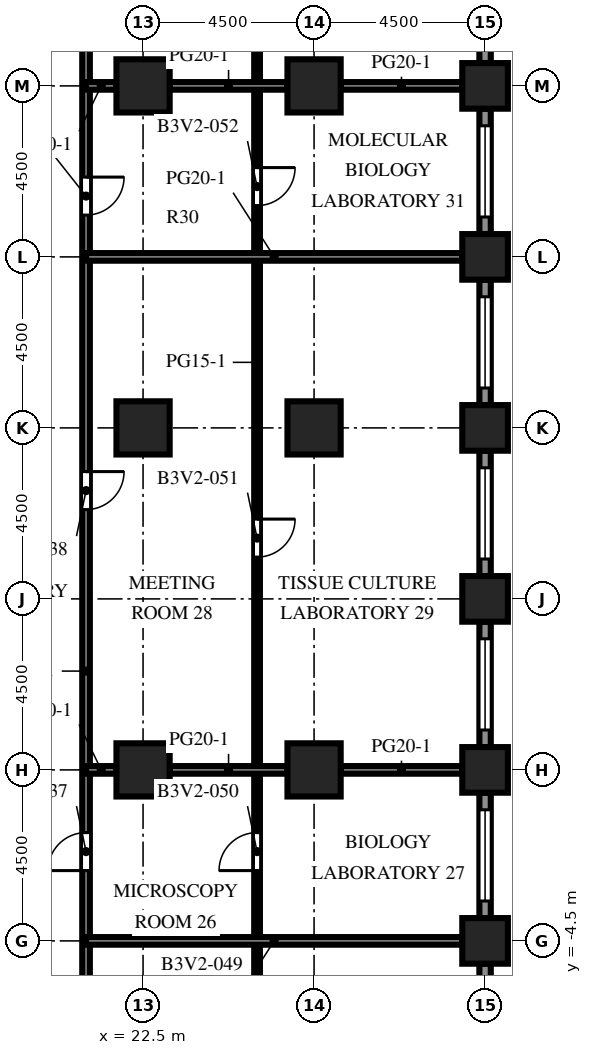
"""IFC4 building model, lengths in metres.
Left out: names, types, materials, properties, quantities, classifications, styles, units other than length and angle.
Written with IfcOpenShell. Run it as: python <this file> out.ifc"""

import sys

from ifc_helpers import new_model, si_unit, direction, frame, frame_2d, origin, origin_2d, place, context, subcontext, project, spatial, rectangle, extrude, element, fill, save


model = new_model("IFC4")
c1 = context("Model", 3, precision=1e-05, world=origin(), true_north=direction((0.0, 1.0)))
c2 = subcontext(c1, "Body", "Model", "MODEL_VIEW")
j1 = project(units=[si_unit("LENGTHUNIT", "METRE"), si_unit("PLANEANGLEUNIT", "RADIAN")], contexts=[c1])
p1 = place(None, origin())
s1 = spatial("IfcSite", under=j1, at=p1, CompositionType="ELEMENT")
p2 = place(p1, origin())
s2 = spatial("IfcBuilding", under=s1, at=p2, CompositionType="ELEMENT")
p3 = place(p2, frame((0.0, 0.0, 102.5)))
s3 = spatial("IfcBuildingStorey", under=s2, at=p3, CompositionType="ELEMENT", Elevation=102.5)
for number, where, z_axis, x_axis in (
    (1, (31.5, -4.5, 0.0), (0.0, 0.0, 1.0), (1.0, 0.0, 0.0)),
    (2, (31.5, 0.0, 0.0), (0.0, 0.0, 1.0), (1.0, 0.0, 0.0)),
    (3, (31.5, 4.5, 0.0), (0.0, 0.0, 1.0), (1.0, 0.0, 0.0)),
    (4, (31.5, 9.0, 0.0), (0.0, 0.0, 1.0), (1.0, 0.0, 0.0)),
    (5, (31.5, 13.5, 0.0), (0.0, 0.0, 1.0), (1.0, 0.0, 0.0)),
    (6, (31.5, 18.0, 0.0), (0.0, 0.0, 1.0), (1.0, 0.0, 0.0)),
):
    element("IfcColumn", number, at=place(p3, frame(where, z_axis=z_axis, x_axis=x_axis)), inside=s3, PredefinedType="COLUMN", context=c2, shape_type="SweptSolid", body=[
        extrude(rectangle(XDim=1.2, YDim=1.2, at=origin_2d()), origin(), (0.0, 0.0, 1.0), 4.1),
    ])
for number, where, z_axis, x_axis in (
    (7, (22.5, 0.0, 0.0), (0.0, 0.0, 1.0), (1.0, 0.0, 0.0)),
    (8, (22.5, 9.0, 0.0), (0.0, 0.0, 1.0), (1.0, 0.0, 0.0)),
    (9, (22.5, 18.0, 0.0), (0.0, 0.0, 1.0), (1.0, 0.0, 0.0)),
    (10, (27.0, 0.0, 0.0), (0.0, 0.0, 1.0), (1.0, 0.0, 0.0)),
    (11, (27.0, 9.0, 0.0), (0.0, 0.0, 1.0), (1.0, 0.0, 0.0)),
    (12, (27.0, 18.0, 0.0), (0.0, 0.0, 1.0), (1.0, 0.0, 0.0)),
):
    element("IfcColumn", number, at=place(p3, frame(where, z_axis=z_axis, x_axis=x_axis)), inside=s3, PredefinedType="COLUMN", context=c2, shape_type="SweptSolid", body=[
        extrude(rectangle(XDim=1.4, YDim=1.4, at=origin_2d()), origin(), (0.0, 0.0, 1.0), 4.1),
    ])
p4 = place(p3, frame((31.5, -5.1, 0.0), z_axis=(0.0, 0.0, 1.0), x_axis=(0.0, -1.0, 0.0)))
e13 = element("IfcWall", 13, at=p4, inside=s3, PredefinedType="SOLIDWALL", context=c2, shape_type="SweptSolid", body=[
    extrude(rectangle(XDim=3.3, YDim=0.3, at=frame_2d((1.65, 0.0))), origin(), (0.0, 0.0, 1.0), 2.75),
])
p5 = place(p4, frame((0.45, 0.0, 0.8)))
e14 = element("IfcOpeningElement", 14, at=p5, cuts=e13, PredefinedType="OPENING", context=c2, shape_type="SweptSolid", body=[
    extrude(rectangle(XDim=2.4, YDim=1.7, at=frame_2d((1.2, 0.85))), frame((0.0, 0.16, 0.0), z_axis=(0.0, -1.0, 0.0), x_axis=(1.0, 0.0, 0.0)), (0.0, 0.0, 1.0), 0.32),
])
p6 = place(p3, frame((31.5, -0.6, 0.0), z_axis=(0.0, 0.0, 1.0), x_axis=(0.0, -1.0, 0.0)))
e15 = element("IfcWall", 15, at=p6, inside=s3, PredefinedType="SOLIDWALL", context=c2, shape_type="SweptSolid", body=[
    extrude(rectangle(XDim=3.3, YDim=0.3, at=frame_2d((1.65, 0.0))), origin(), (0.0, 0.0, 1.0), 2.75),
])
p7 = place(p6, frame((0.45, 0.0, 0.8)))
e16 = element("IfcOpeningElement", 16, at=p7, cuts=e15, PredefinedType="OPENING", context=c2, shape_type="SweptSolid", body=[
    extrude(rectangle(XDim=2.4, YDim=1.7, at=frame_2d((1.2, 0.85))), frame((0.0, 0.16, 0.0), z_axis=(0.0, -1.0, 0.0), x_axis=(1.0, 0.0, 0.0)), (0.0, 0.0, 1.0), 0.32),
])
p8 = place(p3, frame((31.5, 3.9, 0.0), z_axis=(0.0, 0.0, 1.0), x_axis=(0.0, -1.0, 0.0)))
e17 = element("IfcWall", 17, at=p8, inside=s3, PredefinedType="SOLIDWALL", context=c2, shape_type="SweptSolid", body=[
    extrude(rectangle(XDim=3.3, YDim=0.3, at=frame_2d((1.65, 0.0))), origin(), (0.0, 0.0, 1.0), 2.75),
])
p9 = place(p8, frame((0.45, 0.0, 0.8)))
e18 = element("IfcOpeningElement", 18, at=p9, cuts=e17, PredefinedType="OPENING", context=c2, shape_type="SweptSolid", body=[
    extrude(rectangle(XDim=2.4, YDim=1.7, at=frame_2d((1.2, 0.85))), frame((0.0, 0.16, 0.0), z_axis=(0.0, -1.0, 0.0), x_axis=(1.0, 0.0, 0.0)), (0.0, 0.0, 1.0), 0.32),
])
p10 = place(p3, frame((31.5, 8.4, 0.0), z_axis=(0.0, 0.0, 1.0), x_axis=(0.0, -1.0, 0.0)))
e19 = element("IfcWall", 19, at=p10, inside=s3, PredefinedType="SOLIDWALL", context=c2, shape_type="SweptSolid", body=[
    extrude(rectangle(XDim=3.3, YDim=0.3, at=frame_2d((1.65, 0.0))), origin(), (0.0, 0.0, 1.0), 2.75),
])
p11 = place(p10, frame((0.45, 0.0, 0.8)))
e20 = element("IfcOpeningElement", 20, at=p11, cuts=e19, PredefinedType="OPENING", context=c2, shape_type="SweptSolid", body=[
    extrude(rectangle(XDim=2.4, YDim=1.7, at=frame_2d((1.2, 0.85))), frame((0.0, 0.16, 0.0), z_axis=(0.0, -1.0, 0.0), x_axis=(1.0, 0.0, 0.0)), (0.0, 0.0, 1.0), 0.32),
])
p12 = place(p3, frame((31.5, 12.9, 0.0), z_axis=(0.0, 0.0, 1.0), x_axis=(0.0, -1.0, 0.0)))
e21 = element("IfcWall", 21, at=p12, inside=s3, PredefinedType="SOLIDWALL", context=c2, shape_type="SweptSolid", body=[
    extrude(rectangle(XDim=3.3, YDim=0.3, at=frame_2d((1.65, 0.0))), origin(), (0.0, 0.0, 1.0), 2.75),
])
p13 = place(p12, frame((0.45, 0.0, 0.8)))
e22 = element("IfcOpeningElement", 22, at=p13, cuts=e21, PredefinedType="OPENING", context=c2, shape_type="SweptSolid", body=[
    extrude(rectangle(XDim=2.4, YDim=1.7, at=frame_2d((1.2, 0.85))), frame((0.0, 0.16, 0.0), z_axis=(0.0, -1.0, 0.0), x_axis=(1.0, 0.0, 0.0)), (0.0, 0.0, 1.0), 0.32),
])
p14 = place(p3, frame((31.5, 17.4, 0.0), z_axis=(0.0, 0.0, 1.0), x_axis=(0.0, -1.0, 0.0)))
e23 = element("IfcWall", 23, at=p14, inside=s3, PredefinedType="SOLIDWALL", context=c2, shape_type="SweptSolid", body=[
    extrude(rectangle(XDim=3.3, YDim=0.3, at=frame_2d((1.65, 0.0))), origin(), (0.0, 0.0, 1.0), 2.75),
])
p15 = place(p14, frame((0.45, 0.0, 0.8)))
e24 = element("IfcOpeningElement", 24, at=p15, cuts=e23, PredefinedType="OPENING", context=c2, shape_type="SweptSolid", body=[
    extrude(rectangle(XDim=2.4, YDim=1.7, at=frame_2d((1.2, 0.85))), frame((0.0, 0.16, 0.0), z_axis=(0.0, -1.0, 0.0), x_axis=(1.0, 0.0, 0.0)), (0.0, 0.0, 1.0), 0.32),
])
p16 = place(p3, frame((31.5, 21.9, 0.0), z_axis=(0.0, 0.0, 1.0), x_axis=(0.0, -1.0, 0.0)))
e25 = element("IfcWall", 25, at=p16, inside=s3, PredefinedType="SOLIDWALL", context=c2, shape_type="SweptSolid", body=[
    extrude(rectangle(XDim=3.3, YDim=0.3, at=frame_2d((1.65, 0.0))), origin(), (0.0, 0.0, 1.0), 2.75),
])
p17 = place(p16, frame((1.15, 0.0, 0.0)))
e26 = element("IfcOpeningElement", 26, at=p17, cuts=e25, PredefinedType="OPENING", context=c2, shape_type="SweptSolid", body=[
    extrude(rectangle(XDim=1.0, YDim=2.2, at=frame_2d((0.5, 1.1))), frame((0.0, 0.16, 0.0), z_axis=(0.0, -1.0, 0.0), x_axis=(1.0, 0.0, 0.0)), (0.0, 0.0, 1.0), 0.32),
])
p18 = place(p3, frame((21.0, 31.35, 0.0), z_axis=(0.0, 0.0, 1.0), x_axis=(0.0, -1.0, 0.0)))
e27 = element("IfcWall", 27, at=p18, inside=s3, PredefinedType="PARTITIONING", context=c2, shape_type="SweptSolid", body=[
    extrude(rectangle(XDim=53.7, YDim=0.2, at=frame_2d((26.85, 0.0))), origin(), (0.0, 0.0, 1.0), 3.65),
])
p19 = place(p18, frame((50.5, 0.0, 0.0)))
e28 = element("IfcOpeningElement", 28, at=p19, cuts=e27, PredefinedType="OPENING", context=c2, shape_type="SweptSolid", body=[
    extrude(rectangle(XDim=1.0, YDim=2.1, at=frame_2d((0.5, 1.05))), frame((0.0, 0.11, 0.0), z_axis=(0.0, -1.0, 0.0), x_axis=(1.0, 0.0, 0.0)), (0.0, 0.0, 1.0), 0.22),
])
p20 = place(p18, frame((46.5, 0.0, 0.0)))
e29 = element("IfcOpeningElement", 29, at=p20, cuts=e27, PredefinedType="OPENING", context=c2, shape_type="SweptSolid", body=[
    extrude(rectangle(XDim=1.0, YDim=2.1, at=frame_2d((0.5, 1.05))), frame((0.0, 0.11, 0.0), z_axis=(0.0, -1.0, 0.0), x_axis=(1.0, 0.0, 0.0)), (0.0, 0.0, 1.0), 0.22),
])
p21 = place(p18, frame((38.5, 0.0, 0.0)))
e30 = element("IfcOpeningElement", 30, at=p21, cuts=e27, PredefinedType="OPENING", context=c2, shape_type="SweptSolid", body=[
    extrude(rectangle(XDim=1.0, YDim=2.1, at=frame_2d((0.5, 1.05))), frame((0.0, 0.11, 0.0), z_axis=(0.0, -1.0, 0.0), x_axis=(1.0, 0.0, 0.0)), (0.0, 0.0, 1.0), 0.22),
])
p22 = place(p18, frame((33.0, 0.0, 0.0)))
e31 = element("IfcOpeningElement", 31, at=p22, cuts=e27, PredefinedType="OPENING", context=c2, shape_type="SweptSolid", body=[
    extrude(rectangle(XDim=1.0, YDim=2.1, at=frame_2d((0.5, 1.05))), frame((0.0, 0.11, 0.0), z_axis=(0.0, -1.0, 0.0), x_axis=(1.0, 0.0, 0.0)), (0.0, 0.0, 1.0), 0.22),
])
p23 = place(p18, frame((23.5, 0.0, 0.0)))
e32 = element("IfcOpeningElement", 32, at=p23, cuts=e27, PredefinedType="OPENING", context=c2, shape_type="SweptSolid", body=[
    extrude(rectangle(XDim=1.0, YDim=2.1, at=frame_2d((0.5, 1.05))), frame((0.0, 0.11, 0.0), z_axis=(0.0, -1.0, 0.0), x_axis=(1.0, 0.0, 0.0)), (0.0, 0.0, 1.0), 0.22),
])
p24 = place(p18, frame((15.75, 0.0, 0.0)))
e33 = element("IfcOpeningElement", 33, at=p24, cuts=e27, PredefinedType="OPENING", context=c2, shape_type="SweptSolid", body=[
    extrude(rectangle(XDim=1.0, YDim=2.1, at=frame_2d((0.5, 1.05))), frame((0.0, 0.11, 0.0), z_axis=(0.0, -1.0, 0.0), x_axis=(1.0, 0.0, 0.0)), (0.0, 0.0, 1.0), 0.22),
])
p25 = place(p18, frame((7.0, 0.0, 0.0)))
e34 = element("IfcOpeningElement", 34, at=p25, cuts=e27, PredefinedType="OPENING", context=c2, shape_type="SweptSolid", body=[
    extrude(rectangle(XDim=1.0, YDim=2.1, at=frame_2d((0.5, 1.05))), frame((0.0, 0.11, 0.0), z_axis=(0.0, -1.0, 0.0), x_axis=(1.0, 0.0, 0.0)), (0.0, 0.0, 1.0), 0.22),
])
p26 = place(p18, frame((1.0, 0.0, 0.0)))
e35 = element("IfcOpeningElement", 35, at=p26, cuts=e27, PredefinedType="OPENING", context=c2, shape_type="SweptSolid", body=[
    extrude(rectangle(XDim=1.0, YDim=2.1, at=frame_2d((0.5, 1.05))), frame((0.0, 0.11, 0.0), z_axis=(0.0, -1.0, 0.0), x_axis=(1.0, 0.0, 0.0)), (0.0, 0.0, 1.0), 0.22),
])
p27 = place(p3, frame((25.5, 31.35, 0.0), z_axis=(0.0, 0.0, 1.0), x_axis=(0.0, -1.0, 0.0)))
e36 = element("IfcWall", 36, at=p27, inside=s3, PredefinedType="PARTITIONING", context=c2, shape_type="SweptSolid", body=[
    extrude(rectangle(XDim=53.7, YDim=0.15, at=frame_2d((26.85, 0.0))), origin(), (0.0, 0.0, 1.0), 3.65),
])
p28 = place(p27, frame((50.5, 0.0, 0.0)))
e37 = element("IfcOpeningElement", 37, at=p28, cuts=e36, PredefinedType="OPENING", context=c2, shape_type="SweptSolid", body=[
    extrude(rectangle(XDim=1.0, YDim=2.1, at=frame_2d((0.5, 1.05))), frame((0.0, 0.085, 0.0), z_axis=(0.0, -1.0, 0.0), x_axis=(1.0, 0.0, 0.0)), (0.0, 0.0, 1.0), 0.17),
])
p29 = place(p27, frame((46.25, 0.0, 0.0)))
e38 = element("IfcOpeningElement", 38, at=p29, cuts=e36, PredefinedType="OPENING", context=c2, shape_type="SweptSolid", body=[
    extrude(rectangle(XDim=1.0, YDim=2.1, at=frame_2d((0.5, 1.05))), frame((0.0, 0.085, 0.0), z_axis=(0.0, -1.0, 0.0), x_axis=(1.0, 0.0, 0.0)), (0.0, 0.0, 1.0), 0.17),
])
p30 = place(p27, frame((38.5, 0.0, 0.0)))
e39 = element("IfcOpeningElement", 39, at=p30, cuts=e36, PredefinedType="OPENING", context=c2, shape_type="SweptSolid", body=[
    extrude(rectangle(XDim=1.0, YDim=2.1, at=frame_2d((0.5, 1.05))), frame((0.0, 0.085, 0.0), z_axis=(0.0, -1.0, 0.0), x_axis=(1.0, 0.0, 0.0)), (0.0, 0.0, 1.0), 0.17),
])
p31 = place(p27, frame((33.0, 0.0, 0.0)))
e40 = element("IfcOpeningElement", 40, at=p31, cuts=e36, PredefinedType="OPENING", context=c2, shape_type="SweptSolid", body=[
    extrude(rectangle(XDim=1.0, YDim=2.1, at=frame_2d((0.5, 1.05))), frame((0.0, 0.085, 0.0), z_axis=(0.0, -1.0, 0.0), x_axis=(1.0, 0.0, 0.0)), (0.0, 0.0, 1.0), 0.17),
])
p32 = place(p27, frame((24.75, 0.0, 0.0)))
e41 = element("IfcOpeningElement", 41, at=p32, cuts=e36, PredefinedType="OPENING", context=c2, shape_type="SweptSolid", body=[
    extrude(rectangle(XDim=1.0, YDim=2.1, at=frame_2d((0.5, 1.05))), frame((0.0, 0.085, 0.0), z_axis=(0.0, -1.0, 0.0), x_axis=(1.0, 0.0, 0.0)), (0.0, 0.0, 1.0), 0.17),
])
p33 = place(p27, frame((15.5, 0.0, 0.0)))
e42 = element("IfcOpeningElement", 42, at=p33, cuts=e36, PredefinedType="OPENING", context=c2, shape_type="SweptSolid", body=[
    extrude(rectangle(XDim=1.0, YDim=2.1, at=frame_2d((0.5, 1.05))), frame((0.0, 0.085, 0.0), z_axis=(0.0, -1.0, 0.0), x_axis=(1.0, 0.0, 0.0)), (0.0, 0.0, 1.0), 0.17),
])
p34 = place(p27, frame((9.75, 0.0, 0.0)))
e43 = element("IfcOpeningElement", 43, at=p34, cuts=e36, PredefinedType="OPENING", context=c2, shape_type="SweptSolid", body=[
    extrude(rectangle(XDim=1.0, YDim=2.1, at=frame_2d((0.5, 1.05))), frame((0.0, 0.085, 0.0), z_axis=(0.0, -1.0, 0.0), x_axis=(1.0, 0.0, 0.0)), (0.0, 0.0, 1.0), 0.17),
])
p35 = place(p27, frame((1.5, 0.0, 0.0)))
e44 = element("IfcOpeningElement", 44, at=p35, cuts=e36, PredefinedType="OPENING", context=c2, shape_type="SweptSolid", body=[
    extrude(rectangle(XDim=1.0, YDim=2.1, at=frame_2d((0.5, 1.05))), frame((0.0, 0.085, 0.0), z_axis=(0.0, -1.0, 0.0), x_axis=(1.0, 0.0, 0.0)), (0.0, 0.0, 1.0), 0.17),
])
p36 = place(p3, frame((21.0, -4.5, 0.0), z_axis=(0.0, 0.0, 1.0), x_axis=(1.0, 0.0, 0.0)))
e45 = element("IfcWall", 45, at=p36, inside=s3, PredefinedType="PARTITIONING", context=c2, shape_type="SweptSolid", body=[
    extrude(rectangle(XDim=9.9, YDim=0.2, at=frame_2d((4.95, 0.0))), origin(), (0.0, 0.0, 1.0), 3.65),
])
p37 = place(p3, frame((21.0, 0.0, 0.0), z_axis=(0.0, 0.0, 1.0), x_axis=(1.0, 0.0, 0.0)))
e46 = element("IfcWall", 46, at=p37, inside=s3, PredefinedType="PARTITIONING", context=c2, shape_type="SweptSolid", body=[
    extrude(rectangle(XDim=0.8, YDim=0.2, at=frame_2d((0.4, 0.0))), origin(), (0.0, 0.0, 1.0), 3.65),
])
p38 = place(p3, frame((23.2, 0.0, 0.0), z_axis=(0.0, 0.0, 1.0), x_axis=(1.0, 0.0, 0.0)))
e47 = element("IfcWall", 47, at=p38, inside=s3, PredefinedType="PARTITIONING", context=c2, shape_type="SweptSolid", body=[
    extrude(rectangle(XDim=3.1, YDim=0.2, at=frame_2d((1.55, 0.0))), origin(), (0.0, 0.0, 1.0), 3.65),
])
p39 = place(p3, frame((27.7, 0.0, 0.0), z_axis=(0.0, 0.0, 1.0), x_axis=(1.0, 0.0, 0.0)))
e48 = element("IfcWall", 48, at=p39, inside=s3, PredefinedType="PARTITIONING", context=c2, shape_type="SweptSolid", body=[
    extrude(rectangle(XDim=3.2, YDim=0.2, at=frame_2d((1.6, 0.0))), origin(), (0.0, 0.0, 1.0), 3.65),
])
p40 = place(p3, frame((21.0, 13.5, 0.0), z_axis=(0.0, 0.0, 1.0), x_axis=(1.0, 0.0, 0.0)))
e49 = element("IfcWall", 49, at=p40, inside=s3, PredefinedType="PARTITIONING", context=c2, shape_type="SweptSolid", body=[
    extrude(rectangle(XDim=9.9, YDim=0.2, at=frame_2d((4.95, 0.0))), origin(), (0.0, 0.0, 1.0), 3.65),
])
p41 = place(p3, frame((21.0, 18.0, 0.0), z_axis=(0.0, 0.0, 1.0), x_axis=(1.0, 0.0, 0.0)))
e50 = element("IfcWall", 50, at=p41, inside=s3, PredefinedType="PARTITIONING", context=c2, shape_type="SweptSolid", body=[
    extrude(rectangle(XDim=0.8, YDim=0.2, at=frame_2d((0.4, 0.0))), origin(), (0.0, 0.0, 1.0), 3.65),
])
p42 = place(p3, frame((23.2, 18.0, 0.0), z_axis=(0.0, 0.0, 1.0), x_axis=(1.0, 0.0, 0.0)))
e51 = element("IfcWall", 51, at=p42, inside=s3, PredefinedType="PARTITIONING", context=c2, shape_type="SweptSolid", body=[
    extrude(rectangle(XDim=3.1, YDim=0.2, at=frame_2d((1.55, 0.0))), origin(), (0.0, 0.0, 1.0), 3.65),
])
p43 = place(p3, frame((27.7, 18.0, 0.0), z_axis=(0.0, 0.0, 1.0), x_axis=(1.0, 0.0, 0.0)))
e52 = element("IfcWall", 52, at=p43, inside=s3, PredefinedType="PARTITIONING", context=c2, shape_type="SweptSolid", body=[
    extrude(rectangle(XDim=3.2, YDim=0.2, at=frame_2d((1.6, 0.0))), origin(), (0.0, 0.0, 1.0), 3.65),
])
p44 = place(p7, origin())
e53 = element("IfcWindow", 53, at=p44, inside=s3, PartitioningType="SINGLE_PANEL", PredefinedType="WINDOW", context=c2, shape_type="SweptSolid", body=[
    extrude(rectangle(XDim=2.4, YDim=1.7, at=frame_2d((1.2, 0.85))), frame((0.0, 0.03, 0.0), z_axis=(0.0, -1.0, 0.0), x_axis=(1.0, 0.0, 0.0)), (0.0, 0.0, 1.0), 0.06),
])
fill(e16, e53)
p45 = place(p9, origin())
e54 = element("IfcWindow", 54, at=p45, inside=s3, PartitioningType="SINGLE_PANEL", PredefinedType="WINDOW", context=c2, shape_type="SweptSolid", body=[
    extrude(rectangle(XDim=2.4, YDim=1.7, at=frame_2d((1.2, 0.85))), frame((0.0, 0.03, 0.0), z_axis=(0.0, -1.0, 0.0), x_axis=(1.0, 0.0, 0.0)), (0.0, 0.0, 1.0), 0.06),
])
fill(e18, e54)
p46 = place(p11, origin())
e55 = element("IfcWindow", 55, at=p46, inside=s3, PartitioningType="SINGLE_PANEL", PredefinedType="WINDOW", context=c2, shape_type="SweptSolid", body=[
    extrude(rectangle(XDim=2.4, YDim=1.7, at=frame_2d((1.2, 0.85))), frame((0.0, 0.03, 0.0), z_axis=(0.0, -1.0, 0.0), x_axis=(1.0, 0.0, 0.0)), (0.0, 0.0, 1.0), 0.06),
])
fill(e20, e55)
p47 = place(p13, origin())
e56 = element("IfcWindow", 56, at=p47, inside=s3, PartitioningType="SINGLE_PANEL", PredefinedType="WINDOW", context=c2, shape_type="SweptSolid", body=[
    extrude(rectangle(XDim=2.4, YDim=1.7, at=frame_2d((1.2, 0.85))), frame((0.0, 0.03, 0.0), z_axis=(0.0, -1.0, 0.0), x_axis=(1.0, 0.0, 0.0)), (0.0, 0.0, 1.0), 0.06),
])
fill(e22, e56)
p48 = place(p15, origin())
e57 = element("IfcWindow", 57, at=p48, inside=s3, PartitioningType="SINGLE_PANEL", PredefinedType="WINDOW", context=c2, shape_type="SweptSolid", body=[
    extrude(rectangle(XDim=2.4, YDim=1.7, at=frame_2d((1.2, 0.85))), frame((0.0, 0.03, 0.0), z_axis=(0.0, -1.0, 0.0), x_axis=(1.0, 0.0, 0.0)), (0.0, 0.0, 1.0), 0.06),
])
fill(e24, e57)
p49 = place(p22, origin())
e58 = element("IfcDoor", 58, at=p49, inside=s3, OperationType="SINGLE_SWING_RIGHT", PredefinedType="DOOR", context=c2, shape_type="SweptSolid", body=[
    extrude(rectangle(XDim=1.0, YDim=2.1, at=frame_2d((0.5, 1.05))), frame((0.0, 0.025, 0.0), z_axis=(0.0, -1.0, 0.0), x_axis=(1.0, 0.0, 0.0)), (0.0, 0.0, 1.0), 0.05),
])
fill(e31, e58)
p50 = place(p23, origin())
e59 = element("IfcDoor", 59, at=p50, inside=s3, OperationType="SINGLE_SWING_LEFT", PredefinedType="DOOR", context=c2, shape_type="SweptSolid", body=[
    extrude(rectangle(XDim=1.0, YDim=2.1, at=frame_2d((0.5, 1.05))), frame((0.0, 0.025, 0.0), z_axis=(0.0, -1.0, 0.0), x_axis=(1.0, 0.0, 0.0)), (0.0, 0.0, 1.0), 0.05),
])
fill(e32, e59)
p51 = place(p24, origin())
e60 = element("IfcDoor", 60, at=p51, inside=s3, OperationType="SINGLE_SWING_LEFT", PredefinedType="DOOR", context=c2, shape_type="SweptSolid", body=[
    extrude(rectangle(XDim=1.0, YDim=2.1, at=frame_2d((0.5, 1.05))), frame((0.0, 0.025, 0.0), z_axis=(0.0, -1.0, 0.0), x_axis=(1.0, 0.0, 0.0)), (0.0, 0.0, 1.0), 0.05),
])
fill(e33, e60)
p52 = place(p31, origin())
e61 = element("IfcDoor", 61, at=p52, inside=s3, OperationType="SINGLE_SWING_RIGHT", PredefinedType="DOOR", context=c2, shape_type="SweptSolid", body=[
    extrude(rectangle(XDim=1.0, YDim=2.1, at=frame_2d((0.5, 1.05))), frame((0.0, 0.025, 0.0), z_axis=(0.0, -1.0, 0.0), x_axis=(1.0, 0.0, 0.0)), (0.0, 0.0, 1.0), 0.05),
])
fill(e40, e61)
p53 = place(p32, origin())
e62 = element("IfcDoor", 62, at=p53, inside=s3, OperationType="SINGLE_SWING_LEFT", PredefinedType="DOOR", context=c2, shape_type="SweptSolid", body=[
    extrude(rectangle(XDim=1.0, YDim=2.1, at=frame_2d((0.5, 1.05))), frame((0.0, 0.025, 0.0), z_axis=(0.0, -1.0, 0.0), x_axis=(1.0, 0.0, 0.0)), (0.0, 0.0, 1.0), 0.05),
])
fill(e41, e62)
p54 = place(p33, origin())
e63 = element("IfcDoor", 63, at=p54, inside=s3, OperationType="SINGLE_SWING_LEFT", PredefinedType="DOOR", context=c2, shape_type="SweptSolid", body=[
    extrude(rectangle(XDim=1.0, YDim=2.1, at=frame_2d((0.5, 1.05))), frame((0.0, 0.025, 0.0), z_axis=(0.0, -1.0, 0.0), x_axis=(1.0, 0.0, 0.0)), (0.0, 0.0, 1.0), 0.05),
])
fill(e42, e63)
save(model, sys.argv[1])
